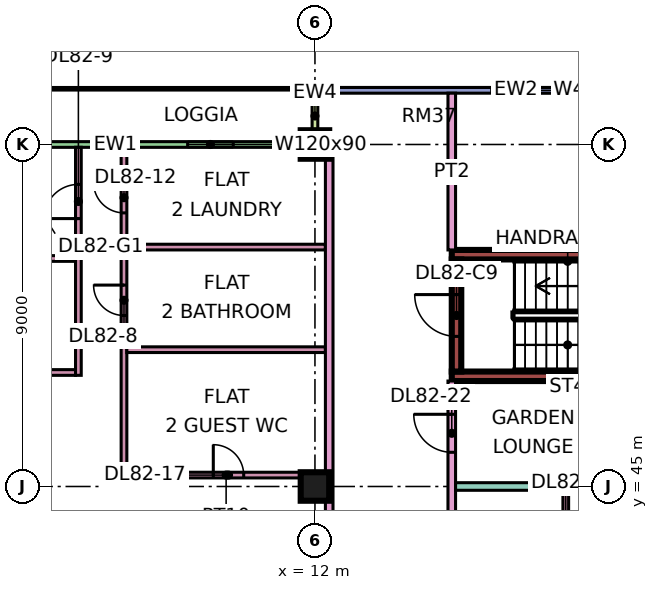
"""IFC4 building model, lengths in metres.
Left out: names, types, materials, properties, quantities, classifications, styles, units other than length and angle.
Written with IfcOpenShell. Run it as: python <this file> out.ifc"""

import sys

from ifc_helpers import new_model, si_unit, direction, frame, frame_2d, origin, origin_2d, place, context, subcontext, project, spatial, rectangle, extrude, element, fill, save


model = new_model("IFC4")
c1 = context("Model", 3, precision=1e-05, world=origin(), true_north=direction((0.0, 1.0)))
c2 = subcontext(c1, "Body", "Model", "MODEL_VIEW")
j1 = project(units=[si_unit("LENGTHUNIT", "METRE"), si_unit("PLANEANGLEUNIT", "RADIAN")], contexts=[c1])
p1 = place(None, origin())
s1 = spatial("IfcSite", under=j1, at=p1, CompositionType="ELEMENT")
p2 = place(p1, origin())
s2 = spatial("IfcBuilding", under=s1, at=p2, CompositionType="ELEMENT")
p3 = place(p2, frame((0.0, 0.0, 353.9)))
s3 = spatial("IfcBuildingStorey", under=s2, at=p3, CompositionType="ELEMENT", Elevation=353.9)
for number, where, z_axis, x_axis in (
    (1, (12.0, 45.0, 0.0), (0.0, 0.0, 1.0), (1.0, 0.0, 0.0)),
    (2, (12.0, 54.0, 0.0), (0.0, 0.0, 1.0), (1.0, 0.0, 0.0)),
):
    element("IfcColumn", number, at=place(p3, frame(where, z_axis=z_axis, x_axis=x_axis)), inside=s3, PredefinedType="COLUMN", context=c2, shape_type="SweptSolid", body=[
        extrude(rectangle(XDim=0.75, YDim=0.75, at=origin_2d()), origin(), (0.0, 0.0, 1.0), 3.75),
    ])
for number, where, z_axis, x_axis in (
    (3, (15.6, 47.9, 0.0), (0.0, 0.0, 1.0), (1.0, 0.0, 0.0)),
    (4, (15.6, 51.1, 0.0), (0.0, 0.0, 1.0), (1.0, 0.0, 0.0)),
):
    element("IfcWall", number, at=place(p3, frame(where, z_axis=z_axis, x_axis=x_axis)), inside=s3, PredefinedType="SHEAR", context=c2, shape_type="SweptSolid", body=[
        extrude(rectangle(XDim=7.0, YDim=0.25, at=frame_2d((3.5, 0.0))), origin(), (0.0, 0.0, 1.0), 3.75),
    ])
p4 = place(p3, frame((15.725, 48.025, 0.0), z_axis=(0.0, 0.0, 1.0), x_axis=(0.0, 1.0, 0.0)))
e5 = element("IfcWall", 5, at=p4, inside=s3, PredefinedType="SHEAR", context=c2, shape_type="SweptSolid", body=[
    extrude(rectangle(XDim=2.95, YDim=0.25, at=frame_2d((1.475, 0.0))), origin(), (0.0, 0.0, 1.0), 3.75),
])
p5 = place(p4, frame((0.925, 0.0, 0.0)))
e6 = element("IfcOpeningElement", 6, at=p5, cuts=e5, PredefinedType="OPENING", context=c2, shape_type="SweptSolid", body=[
    extrude(rectangle(XDim=1.1, YDim=2.2, at=frame_2d((0.55, 1.1))), frame((0.0, 0.135, 0.0), z_axis=(0.0, -1.0, 0.0), x_axis=(1.0, 0.0, 0.0)), (0.0, 0.0, 1.0), 0.27),
])
p6 = place(p3, frame((22.5, 55.425, 0.0), z_axis=(0.0, 0.0, 1.0), x_axis=(-1.0, 0.0, 0.0)))
e7 = element("IfcWall", 7, at=p6, inside=s3, PredefinedType="SOLIDWALL", context=c2, shape_type="SweptSolid", body=[
    extrude(rectangle(XDim=10.425, YDim=0.15, at=frame_2d((5.212, 0.0))), origin(), (0.0, 0.0, 1.0), 3.35),
])
p7 = place(p6, frame((1.05, 0.0, 0.45)))
e8 = element("IfcOpeningElement", 8, at=p7, cuts=e7, PredefinedType="OPENING", context=c2, shape_type="SweptSolid", body=[
    extrude(rectangle(XDim=4.8, YDim=2.4, at=frame_2d((2.4, 1.2))), frame((0.0, 0.085, 0.0), z_axis=(0.0, -1.0, 0.0), x_axis=(1.0, 0.0, 0.0)), (0.0, 0.0, 1.0), 0.17),
])
p8 = place(p3, frame((11.925, 54.0, 0.0), z_axis=(0.0, 0.0, 1.0), x_axis=(-1.0, 0.0, 0.0)))
e9 = element("IfcWall", 9, at=p8, inside=s3, PredefinedType="SOLIDWALL", context=c2, shape_type="SweptSolid", body=[
    extrude(rectangle(XDim=10.35, YDim=0.15, at=frame_2d((5.175, 0.0))), origin(), (0.0, 0.0, 1.0), 3.35),
])
p9 = place(p8, frame((2.075, 0.0, 1.7)))
e10 = element("IfcOpeningElement", 10, at=p9, cuts=e9, PredefinedType="OPENING", context=c2, shape_type="SweptSolid", body=[
    extrude(rectangle(XDim=1.2, YDim=0.9, at=frame_2d((0.6, 0.45))), frame((0.0, 0.085, 0.0), z_axis=(0.0, -1.0, 0.0), x_axis=(1.0, 0.0, 0.0)), (0.0, 0.0, 1.0), 0.17),
])
p10 = place(p8, frame((7.35, 0.0, 0.0)))
e11 = element("IfcOpeningElement", 11, at=p10, cuts=e9, PredefinedType="OPENING", context=c2, shape_type="SweptSolid", body=[
    extrude(rectangle(XDim=1.8, YDim=2.4, at=frame_2d((0.9, 1.2))), frame((0.0, 0.085, 0.0), z_axis=(0.0, -1.0, 0.0), x_axis=(1.0, 0.0, 0.0)), (0.0, 0.0, 1.0), 0.17),
])
p11 = place(p3, frame((12.0, 55.5, 0.0), z_axis=(0.0, 0.0, 1.0), x_axis=(0.0, -1.0, 0.0)))
e12 = element("IfcWall", 12, at=p11, inside=s3, PredefinedType="SOLIDWALL", context=c2, shape_type="SweptSolid", body=[
    extrude(rectangle(XDim=1.5, YDim=0.15, at=frame_2d((0.75, 0.0))), origin(), (0.0, 0.0, 1.0), 3.35),
])
p12 = place(p3, frame((0.0, 48.0, 0.0), z_axis=(0.0, 0.0, 1.0), x_axis=(1.0, 0.0, 0.0)))
e13 = element("IfcWall", 13, at=p12, inside=s3, PredefinedType="PARTITIONING", context=c2, shape_type="SweptSolid", body=[
    extrude(rectangle(XDim=5.7, YDim=0.15, at=frame_2d((2.85, 0.0))), origin(), (0.0, 0.0, 1.0), 3.35),
])
p13 = place(p3, frame((3.375, 51.0, 0.0), z_axis=(0.0, 0.0, 1.0), x_axis=(1.0, 0.0, 0.0)))
e14 = element("IfcWall", 14, at=p13, inside=s3, PredefinedType="PARTITIONING", context=c2, shape_type="SweptSolid", body=[
    extrude(rectangle(XDim=2.325, YDim=0.15, at=frame_2d((1.163, 0.0))), origin(), (0.0, 0.0, 1.0), 3.35),
])
p14 = place(p3, frame((5.775, 47.925, 0.0), z_axis=(0.0, 0.0, 1.0), x_axis=(0.0, 1.0, 0.0)))
e15 = element("IfcWall", 15, at=p14, inside=s3, PredefinedType="PARTITIONING", context=c2, shape_type="SweptSolid", body=[
    extrude(rectangle(XDim=6.001, YDim=0.15, at=frame_2d((3.0, 0.0))), origin(), (0.0, 0.0, 1.0), 3.35),
])
p15 = place(p14, frame((4.125, 0.0, 0.0)))
e16 = element("IfcOpeningElement", 16, at=p15, cuts=e15, PredefinedType="OPENING", context=c2, shape_type="SweptSolid", body=[
    extrude(rectangle(XDim=0.9, YDim=2.1, at=frame_2d((0.45, 1.05))), frame((0.0, 0.085, 0.0), z_axis=(0.0, -1.0, 0.0), x_axis=(1.0, 0.0, 0.0)), (0.0, 0.0, 1.0), 0.17),
])
p16 = place(p3, frame((6.975, 45.225, 0.0), z_axis=(0.0, 0.0, 1.0), x_axis=(0.0, 1.0, 0.0)))
e17 = element("IfcWall", 17, at=p16, inside=s3, PredefinedType="PARTITIONING", context=c2, shape_type="SweptSolid", body=[
    extrude(rectangle(XDim=8.701, YDim=0.15, at=frame_2d((4.351, 0.0))), origin(), (0.0, 0.0, 1.0), 3.35),
])
p17 = place(p16, frame((4.275, 0.0, 0.0)))
e18 = element("IfcOpeningElement", 18, at=p17, cuts=e17, PredefinedType="OPENING", context=c2, shape_type="SweptSolid", body=[
    extrude(rectangle(XDim=0.8, YDim=2.1, at=frame_2d((0.4, 1.05))), frame((0.0, 0.085, 0.0), z_axis=(0.0, -1.0, 0.0), x_axis=(1.0, 0.0, 0.0)), (0.0, 0.0, 1.0), 0.17),
])
p18 = place(p16, frame((6.975, 0.0, 0.0)))
e19 = element("IfcOpeningElement", 19, at=p18, cuts=e17, PredefinedType="OPENING", context=c2, shape_type="SweptSolid", body=[
    extrude(rectangle(XDim=0.8, YDim=2.1, at=frame_2d((0.4, 1.05))), frame((0.0, 0.085, 0.0), z_axis=(0.0, -1.0, 0.0), x_axis=(1.0, 0.0, 0.0)), (0.0, 0.0, 1.0), 0.17),
])
p19 = place(p3, frame((7.05, 45.3, 0.0), z_axis=(0.0, 0.0, 1.0), x_axis=(1.0, 0.0, 0.0)))
e20 = element("IfcWall", 20, at=p19, inside=s3, PredefinedType="PARTITIONING", context=c2, shape_type="SweptSolid", body=[
    extrude(rectangle(XDim=5.225, YDim=0.15, at=frame_2d((2.612, 0.0))), origin(), (0.0, 0.0, 1.0), 3.35),
])
p20 = place(p19, frame((2.275, 0.0, 0.0)))
e21 = element("IfcOpeningElement", 21, at=p20, cuts=e20, PredefinedType="OPENING", context=c2, shape_type="SweptSolid", body=[
    extrude(rectangle(XDim=0.8, YDim=2.1, at=frame_2d((0.4, 1.05))), frame((0.0, 0.085, 0.0), z_axis=(0.0, -1.0, 0.0), x_axis=(1.0, 0.0, 0.0)), (0.0, 0.0, 1.0), 0.17),
])
for number, where, z_axis, x_axis in (
    (22, (7.05, 48.6, 0.0), (0.0, 0.0, 1.0), (1.0, 0.0, 0.0)),
    (23, (7.05, 51.3, 0.0), (0.0, 0.0, 1.0), (1.0, 0.0, 0.0)),
):
    element("IfcWall", number, at=place(p3, frame(where, z_axis=z_axis, x_axis=x_axis)), inside=s3, PredefinedType="PARTITIONING", context=c2, shape_type="SweptSolid", body=[
        extrude(rectangle(XDim=5.225, YDim=0.15, at=frame_2d((2.612, 0.0))), origin(), (0.0, 0.0, 1.0), 3.35),
    ])
p21 = place(p3, frame((12.375, 20.0, 0.0), z_axis=(0.0, 0.0, 1.0), x_axis=(0.0, 1.0, 0.0)))
e24 = element("IfcWall", 24, at=p21, inside=s3, PredefinedType="PARTITIONING", context=c2, shape_type="SweptSolid", body=[
    extrude(rectangle(XDim=34.0, YDim=0.2, at=frame_2d((17.0, 0.0))), origin(), (0.0, 0.0, 1.0), 3.35),
])
p22 = place(p21, frame((22.95, 0.0, 0.0)))
e25 = element("IfcOpeningElement", 25, at=p22, cuts=e24, PredefinedType="OPENING", context=c2, shape_type="SweptSolid", body=[
    extrude(rectangle(XDim=1.0, YDim=2.1, at=frame_2d((0.5, 1.05))), frame((0.0, 0.11, 0.0), z_axis=(0.0, -1.0, 0.0), x_axis=(1.0, 0.0, 0.0)), (0.0, 0.0, 1.0), 0.22),
])
p23 = place(p21, frame((0.6, 0.0, 0.0)))
e26 = element("IfcOpeningElement", 26, at=p23, cuts=e24, PredefinedType="OPENING", context=c2, shape_type="SweptSolid", body=[
    extrude(rectangle(XDim=1.2, YDim=2.1, at=frame_2d((0.6, 1.05))), frame((0.0, 0.11, 0.0), z_axis=(0.0, -1.0, 0.0), x_axis=(1.0, 0.0, 0.0)), (0.0, 0.0, 1.0), 0.22),
])
p24 = place(p21, frame((13.65, 0.0, 0.0)))
e27 = element("IfcOpeningElement", 27, at=p24, cuts=e24, PredefinedType="OPENING", context=c2, shape_type="SweptSolid", body=[
    extrude(rectangle(XDim=1.0, YDim=2.1, at=frame_2d((0.5, 1.05))), frame((0.0, 0.11, 0.0), z_axis=(0.0, -1.0, 0.0), x_axis=(1.0, 0.0, 0.0)), (0.0, 0.0, 1.0), 0.22),
])
p25 = place(p3, frame((15.6, 20.0, 0.0), z_axis=(0.0, 0.0, 1.0), x_axis=(0.0, 1.0, 0.0)))
e28 = element("IfcWall", 28, at=p25, inside=s3, PredefinedType="PARTITIONING", context=c2, shape_type="SweptSolid", body=[
    extrude(rectangle(XDim=27.775, YDim=0.2, at=frame_2d((13.887, 0.0))), origin(), (0.0, 0.0, 1.0), 3.35),
])
p26 = place(p25, frame((5.95, 0.0, 0.0)))
e29 = element("IfcOpeningElement", 29, at=p26, cuts=e28, PredefinedType="OPENING", context=c2, shape_type="SweptSolid", body=[
    extrude(rectangle(XDim=1.0, YDim=2.1, at=frame_2d((0.5, 1.05))), frame((0.0, 0.11, 0.0), z_axis=(0.0, -1.0, 0.0), x_axis=(1.0, 0.0, 0.0)), (0.0, 0.0, 1.0), 0.22),
])
p27 = place(p25, frame((12.0, 0.0, 0.0)))
e30 = element("IfcOpeningElement", 30, at=p27, cuts=e28, PredefinedType="OPENING", context=c2, shape_type="SweptSolid", body=[
    extrude(rectangle(XDim=1.0, YDim=2.1, at=frame_2d((0.5, 1.05))), frame((0.0, 0.11, 0.0), z_axis=(0.0, -1.0, 0.0), x_axis=(1.0, 0.0, 0.0)), (0.0, 0.0, 1.0), 0.22),
])
p28 = place(p25, frame((16.75, 0.0, 0.0)))
e31 = element("IfcOpeningElement", 31, at=p28, cuts=e28, PredefinedType="OPENING", context=c2, shape_type="SweptSolid", body=[
    extrude(rectangle(XDim=1.0, YDim=2.1, at=frame_2d((0.5, 1.05))), frame((0.0, 0.11, 0.0), z_axis=(0.0, -1.0, 0.0), x_axis=(1.0, 0.0, 0.0)), (0.0, 0.0, 1.0), 0.22),
])
p29 = place(p25, frame((1.15, 0.0, 0.0)))
e32 = element("IfcOpeningElement", 32, at=p29, cuts=e28, PredefinedType="OPENING", context=c2, shape_type="SweptSolid", body=[
    extrude(rectangle(XDim=1.8, YDim=2.1, at=frame_2d((0.9, 1.05))), frame((0.0, 0.11, 0.0), z_axis=(0.0, -1.0, 0.0), x_axis=(1.0, 0.0, 0.0)), (0.0, 0.0, 1.0), 0.22),
])
p30 = place(p25, frame((25.9, 0.0, 0.0)))
e33 = element("IfcOpeningElement", 33, at=p30, cuts=e28, PredefinedType="OPENING", context=c2, shape_type="SweptSolid", body=[
    extrude(rectangle(XDim=1.0, YDim=2.1, at=frame_2d((0.5, 1.05))), frame((0.0, 0.11, 0.0), z_axis=(0.0, -1.0, 0.0), x_axis=(1.0, 0.0, 0.0)), (0.0, 0.0, 1.0), 0.22),
])
p31 = place(p3, frame((15.6, 51.225, 0.0), z_axis=(0.0, 0.0, 1.0), x_axis=(0.0, 1.0, 0.0)))
e34 = element("IfcWall", 34, at=p31, inside=s3, PredefinedType="PARTITIONING", context=c2, shape_type="SweptSolid", body=[
    extrude(rectangle(XDim=4.125, YDim=0.2, at=frame_2d((2.062, 0.0))), origin(), (0.0, 0.0, 1.0), 3.35),
])
p32 = place(p3, frame((15.7, 45.0, 0.0), z_axis=(0.0, 0.0, 1.0), x_axis=(1.0, 0.0, 0.0)))
e35 = element("IfcWall", 35, at=p32, inside=s3, PredefinedType="PARTITIONING", context=c2, shape_type="SweptSolid", body=[
    extrude(rectangle(XDim=8.3, YDim=0.2, at=frame_2d((4.15, 0.0))), origin(), (0.0, 0.0, 1.0), 3.35),
])
p33 = place(p3, frame((18.6, 38.325, 0.0), z_axis=(0.0, 0.0, 1.0), x_axis=(0.0, 1.0, 0.0)))
e36 = element("IfcWall", 36, at=p33, inside=s3, PredefinedType="PARTITIONING", context=c2, shape_type="SweptSolid", body=[
    extrude(rectangle(XDim=6.575, YDim=0.15, at=frame_2d((3.288, 0.0))), origin(), (0.0, 0.0, 1.0), 3.35),
])
p34 = place(p33, frame((1.525, 0.0, 0.0)))
e37 = element("IfcOpeningElement", 37, at=p34, cuts=e36, PredefinedType="OPENING", context=c2, shape_type="SweptSolid", body=[
    extrude(rectangle(XDim=0.8, YDim=2.1, at=frame_2d((0.4, 1.05))), frame((0.0, 0.085, 0.0), z_axis=(0.0, -1.0, 0.0), x_axis=(1.0, 0.0, 0.0)), (0.0, 0.0, 1.0), 0.17),
])
p35 = place(p33, frame((4.725, 0.0, 0.0)))
e38 = element("IfcOpeningElement", 38, at=p35, cuts=e36, PredefinedType="OPENING", context=c2, shape_type="SweptSolid", body=[
    extrude(rectangle(XDim=0.9, YDim=2.1, at=frame_2d((0.45, 1.05))), frame((0.0, 0.085, 0.0), z_axis=(0.0, -1.0, 0.0), x_axis=(1.0, 0.0, 0.0)), (0.0, 0.0, 1.0), 0.17),
])
p36 = place(p7, origin())
e39 = element("IfcWindow", 39, at=p36, inside=s3, PartitioningType="SINGLE_PANEL", PredefinedType="WINDOW", context=c2, shape_type="SweptSolid", body=[
    extrude(rectangle(XDim=4.8, YDim=2.4, at=frame_2d((2.4, 1.2))), frame((0.0, 0.03, 0.0), z_axis=(0.0, -1.0, 0.0), x_axis=(1.0, 0.0, 0.0)), (0.0, 0.0, 1.0), 0.06),
])
fill(e8, e39)
p37 = place(p9, origin())
e40 = element("IfcWindow", 40, at=p37, inside=s3, PartitioningType="SINGLE_PANEL", PredefinedType="WINDOW", context=c2, shape_type="SweptSolid", body=[
    extrude(rectangle(XDim=1.2, YDim=0.9, at=frame_2d((0.6, 0.45))), frame((0.0, 0.03, 0.0), z_axis=(0.0, -1.0, 0.0), x_axis=(1.0, 0.0, 0.0)), (0.0, 0.0, 1.0), 0.06),
])
fill(e10, e40)
p38 = place(p5, frame((1.1, 0.0, 0.0), z_axis=(0.0, 0.0, 1.0), x_axis=(-1.0, 0.0, 0.0)))
e41 = element("IfcDoor", 41, at=p38, inside=s3, OperationType="SINGLE_SWING_RIGHT", PredefinedType="DOOR", context=c2, shape_type="SweptSolid", body=[
    extrude(rectangle(XDim=1.1, YDim=2.2, at=frame_2d((0.55, 1.1))), frame((0.0, 0.025, 0.0), z_axis=(0.0, -1.0, 0.0), x_axis=(1.0, 0.0, 0.0)), (0.0, 0.0, 1.0), 0.05),
])
fill(e6, e41)
p39 = place(p17, frame((0.8, 0.0, 0.0), z_axis=(0.0, 0.0, 1.0), x_axis=(-1.0, 0.0, 0.0)))
e42 = element("IfcDoor", 42, at=p39, inside=s3, OperationType="SINGLE_SWING_RIGHT", PredefinedType="DOOR", context=c2, shape_type="SweptSolid", body=[
    extrude(rectangle(XDim=0.8, YDim=2.1, at=frame_2d((0.4, 1.05))), frame((0.0, 0.025, 0.0), z_axis=(0.0, -1.0, 0.0), x_axis=(1.0, 0.0, 0.0)), (0.0, 0.0, 1.0), 0.05),
])
fill(e18, e42)
p40 = place(p15, origin())
e43 = element("IfcDoor", 43, at=p40, inside=s3, OperationType="SINGLE_SWING_LEFT", PredefinedType="DOOR", context=c2, shape_type="SweptSolid", body=[
    extrude(rectangle(XDim=0.9, YDim=2.1, at=frame_2d((0.45, 1.05))), frame((0.0, 0.025, 0.0), z_axis=(0.0, -1.0, 0.0), x_axis=(1.0, 0.0, 0.0)), (0.0, 0.0, 1.0), 0.05),
])
fill(e16, e43)
p41 = place(p18, frame((0.8, 0.0, 0.0), z_axis=(0.0, 0.0, 1.0), x_axis=(-1.0, 0.0, 0.0)))
e44 = element("IfcDoor", 44, at=p41, inside=s3, OperationType="SINGLE_SWING_RIGHT", PredefinedType="DOOR", context=c2, shape_type="SweptSolid", body=[
    extrude(rectangle(XDim=0.8, YDim=2.1, at=frame_2d((0.4, 1.05))), frame((0.0, 0.025, 0.0), z_axis=(0.0, -1.0, 0.0), x_axis=(1.0, 0.0, 0.0)), (0.0, 0.0, 1.0), 0.05),
])
fill(e19, e44)
p42 = place(p20, origin())
e45 = element("IfcDoor", 45, at=p42, inside=s3, OperationType="SINGLE_SWING_LEFT", PredefinedType="DOOR", context=c2, shape_type="SweptSolid", body=[
    extrude(rectangle(XDim=0.8, YDim=2.1, at=frame_2d((0.4, 1.05))), frame((0.0, 0.025, 0.0), z_axis=(0.0, -1.0, 0.0), x_axis=(1.0, 0.0, 0.0)), (0.0, 0.0, 1.0), 0.05),
])
fill(e21, e45)
p43 = place(p30, frame((1.0, 0.0, 0.0), z_axis=(0.0, 0.0, 1.0), x_axis=(-1.0, 0.0, 0.0)))
e46 = element("IfcDoor", 46, at=p43, inside=s3, OperationType="SINGLE_SWING_RIGHT", PredefinedType="DOOR", context=c2, shape_type="SweptSolid", body=[
    extrude(rectangle(XDim=1.0, YDim=2.1, at=frame_2d((0.5, 1.05))), frame((0.0, 0.025, 0.0), z_axis=(0.0, -1.0, 0.0), x_axis=(1.0, 0.0, 0.0)), (0.0, 0.0, 1.0), 0.05),
])
fill(e33, e46)
save(model, sys.argv[1])
